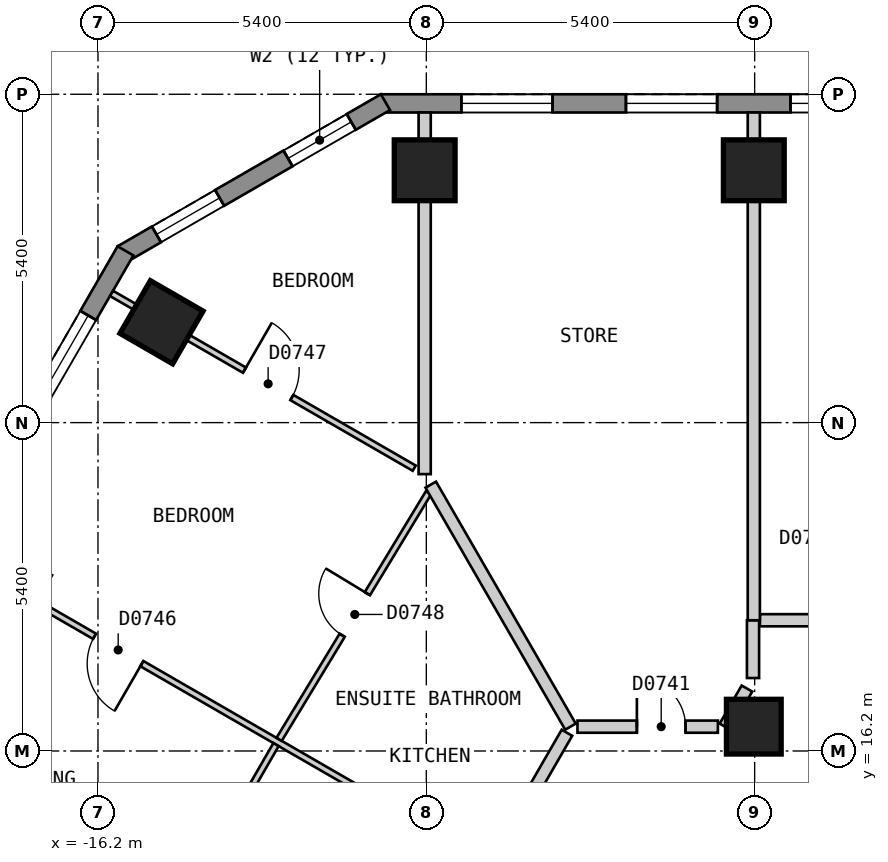
"""IFC4 building model, lengths in metres.
Left out: names, types, materials, properties, quantities, classifications, styles, units other than length and angle.
Written with IfcOpenShell. Run it as: python <this file> out.ifc"""

import sys

from ifc_helpers import new_model, si_unit, direction, frame, frame_2d, origin, origin_2d, place, context, subcontext, project, spatial, polyline, rectangle, outline, extrude, element, fill, save


model = new_model("IFC4")
c1 = context("Model", 3, precision=1e-05, world=origin(), true_north=direction((0.0, 1.0)))
c2 = subcontext(c1, "Body", "Model", "MODEL_VIEW")
j1 = project(units=[si_unit("LENGTHUNIT", "METRE"), si_unit("PLANEANGLEUNIT", "RADIAN")], contexts=[c1])
p1 = place(None, origin())
s1 = spatial("IfcSite", under=j1, at=p1, CompositionType="ELEMENT")
p2 = place(p1, origin())
s2 = spatial("IfcBuilding", under=s1, at=p2, CompositionType="ELEMENT")
p3 = place(p2, frame((0.0, 0.0, 93.0)))
s3 = spatial("IfcBuildingStorey", under=s2, at=p3, CompositionType="ELEMENT", Elevation=93.0)
for number, where, z_axis, x_axis in (
    (1, (-5.414, 25.75, 0.0), (0.0, 0.0, 1.0), (-1.0, 0.0, 0.0)),
    (2, (-10.827, 25.75, 0.0), (0.0, 0.0, 1.0), (-1.0, 0.0, 0.0)),
    (3, (-15.155, 23.251, 0.0), (0.0, 0.0, 1.0), (-0.5, -0.866, 0.0)),
):
    element("IfcColumn", number, at=place(p3, frame(where, z_axis=z_axis, x_axis=x_axis)), inside=s3, PredefinedType="COLUMN", context=c2, shape_type="SweptSolid", body=[
        extrude(rectangle(XDim=1.0, YDim=1.0, at=origin_2d()), origin(), (0.0, 0.0, 1.0), 3.0),
    ])
p4 = place(p3, frame((-5.414, 16.6, 0.0), z_axis=(0.0, 0.0, 1.0), x_axis=(-1.0, 0.0, 0.0)))
e4 = element("IfcColumn", 4, at=p4, inside=s3, PredefinedType="COLUMN", context=c2, shape_type="SweptSolid", body=[
    extrude(rectangle(XDim=0.9, YDim=0.9, at=origin_2d()), origin(), (0.0, 0.0, 1.0), 3.0),
])
p5 = place(p3, frame((11.547, 26.85, 0.0), z_axis=(0.0, 0.0, 1.0), x_axis=(-1.0, 0.0, 0.0)))
e5 = element("IfcWall", 5, at=p5, inside=s3, PredefinedType="SOLIDWALL", context=c2, shape_type="SweptSolid", body=[
    extrude(outline(polyline([(0.0, -0.15), (23.094, -0.15), (23.014, 0.15), (0.08, 0.15), (0.0, -0.15)])), origin(), (0.0, 0.0, 1.0), 2.7),
])
p6 = place(p5, frame((1.325, 0.0, 0.15)))
e6 = element("IfcOpeningElement", 6, at=p6, cuts=e5, PredefinedType="OPENING", context=c2, shape_type="SweptSolid", body=[
    extrude(rectangle(XDim=1.5, YDim=2.1, at=frame_2d((0.75, 1.05))), frame((0.0, 0.16, 0.0), z_axis=(0.0, -1.0, 0.0), x_axis=(1.0, 0.0, 0.0)), (0.0, 0.0, 1.0), 0.32),
])
p7 = place(p5, frame((4.032, 0.0, 0.15)))
e7 = element("IfcOpeningElement", 7, at=p7, cuts=e5, PredefinedType="OPENING", context=c2, shape_type="SweptSolid", body=[
    extrude(rectangle(XDim=1.5, YDim=2.1, at=frame_2d((0.75, 1.05))), frame((0.0, 0.16, 0.0), z_axis=(0.0, -1.0, 0.0), x_axis=(1.0, 0.0, 0.0)), (0.0, 0.0, 1.0), 0.32),
])
p8 = place(p5, frame((6.738, 0.0, 0.15)))
e8 = element("IfcOpeningElement", 8, at=p8, cuts=e5, PredefinedType="OPENING", context=c2, shape_type="SweptSolid", body=[
    extrude(rectangle(XDim=1.5, YDim=2.1, at=frame_2d((0.75, 1.05))), frame((0.0, 0.16, 0.0), z_axis=(0.0, -1.0, 0.0), x_axis=(1.0, 0.0, 0.0)), (0.0, 0.0, 1.0), 0.32),
])
p9 = place(p5, frame((9.445, 0.0, 0.15)))
e9 = element("IfcOpeningElement", 9, at=p9, cuts=e5, PredefinedType="OPENING", context=c2, shape_type="SweptSolid", body=[
    extrude(rectangle(XDim=1.5, YDim=2.1, at=frame_2d((0.75, 1.05))), frame((0.0, 0.16, 0.0), z_axis=(0.0, -1.0, 0.0), x_axis=(1.0, 0.0, 0.0)), (0.0, 0.0, 1.0), 0.32),
])
p10 = place(p5, frame((12.151, 0.0, 0.15)))
e10 = element("IfcOpeningElement", 10, at=p10, cuts=e5, PredefinedType="OPENING", context=c2, shape_type="SweptSolid", body=[
    extrude(rectangle(XDim=1.5, YDim=2.1, at=frame_2d((0.75, 1.05))), frame((0.0, 0.16, 0.0), z_axis=(0.0, -1.0, 0.0), x_axis=(1.0, 0.0, 0.0)), (0.0, 0.0, 1.0), 0.32),
])
p11 = place(p5, frame((14.858, 0.0, 0.15)))
e11 = element("IfcOpeningElement", 11, at=p11, cuts=e5, PredefinedType="OPENING", context=c2, shape_type="SweptSolid", body=[
    extrude(rectangle(XDim=1.5, YDim=2.1, at=frame_2d((0.75, 1.05))), frame((0.0, 0.16, 0.0), z_axis=(0.0, -1.0, 0.0), x_axis=(1.0, 0.0, 0.0)), (0.0, 0.0, 1.0), 0.32),
])
p12 = place(p5, frame((17.564, 0.0, 0.15)))
e12 = element("IfcOpeningElement", 12, at=p12, cuts=e5, PredefinedType="OPENING", context=c2, shape_type="SweptSolid", body=[
    extrude(rectangle(XDim=1.5, YDim=2.1, at=frame_2d((0.75, 1.05))), frame((0.0, 0.16, 0.0), z_axis=(0.0, -1.0, 0.0), x_axis=(1.0, 0.0, 0.0)), (0.0, 0.0, 1.0), 0.32),
])
p13 = place(p5, frame((20.271, 0.0, 0.15)))
e13 = element("IfcOpeningElement", 13, at=p13, cuts=e5, PredefinedType="OPENING", context=c2, shape_type="SweptSolid", body=[
    extrude(rectangle(XDim=1.5, YDim=2.1, at=frame_2d((0.75, 1.05))), frame((0.0, 0.16, 0.0), z_axis=(0.0, -1.0, 0.0), x_axis=(1.0, 0.0, 0.0)), (0.0, 0.0, 1.0), 0.32),
])
p14 = place(p3, frame((-11.472, 26.87, 0.0), z_axis=(0.0, 0.0, 1.0), x_axis=(-0.866022959057, -0.500004234368, 0.0)))
e14 = element("IfcWall", 14, at=p14, inside=s3, PredefinedType="SOLIDWALL", context=c2, shape_type="SweptSolid", body=[
    extrude(outline(polyline([(0.0, -0.15), (5.0, -0.15), (4.92, 0.15), (0.08, 0.15), (0.0, -0.15)])), origin(), (0.0, 0.0, 1.0), 2.7),
])
p15 = place(p14, frame((0.65, 0.0, 0.15)))
e15 = element("IfcOpeningElement", 15, at=p15, cuts=e14, PredefinedType="OPENING", context=c2, shape_type="SweptSolid", body=[
    extrude(rectangle(XDim=1.2, YDim=2.1, at=frame_2d((0.6, 1.05))), frame((0.0, 0.16, 0.0), z_axis=(0.0, -1.0, 0.0), x_axis=(1.0, 0.0, 0.0)), (0.0, 0.0, 1.0), 0.32),
])
p16 = place(p14, frame((3.149, 0.0, 0.15)))
e16 = element("IfcOpeningElement", 16, at=p16, cuts=e14, PredefinedType="OPENING", context=c2, shape_type="SweptSolid", body=[
    extrude(rectangle(XDim=1.2, YDim=2.1, at=frame_2d((0.6, 1.05))), frame((0.0, 0.16, 0.0), z_axis=(0.0, -1.0, 0.0), x_axis=(1.0, 0.0, 0.0)), (0.0, 0.0, 1.0), 0.32),
])
p17 = place(p3, frame((-15.747, 24.425, 0.0), z_axis=(0.0, 0.0, 1.0), x_axis=(-0.500027479704, -0.866009537788, 0.0)))
e17 = element("IfcWall", 17, at=p17, inside=s3, PredefinedType="SOLIDWALL", context=c2, shape_type="SweptSolid", body=[
    extrude(outline(polyline([(0.0, -0.15), (26.559, -0.15), (26.478, 0.15), (0.08, 0.15), (0.0, -0.15)])), origin(), (0.0, 0.0, 1.0), 2.7),
])
p18 = place(p17, frame((1.227, 0.0, 0.15)))
e18 = element("IfcOpeningElement", 18, at=p18, cuts=e17, PredefinedType="OPENING", context=c2, shape_type="SweptSolid", body=[
    extrude(rectangle(XDim=1.5, YDim=2.1, at=frame_2d((0.75, 1.05))), frame((0.0, 0.16, 0.0), z_axis=(0.0, -1.0, 0.0), x_axis=(1.0, 0.0, 0.0)), (0.0, 0.0, 1.0), 0.32),
])
p19 = place(p17, frame((3.739, 0.0, 0.15)))
e19 = element("IfcOpeningElement", 19, at=p19, cuts=e17, PredefinedType="OPENING", context=c2, shape_type="SweptSolid", body=[
    extrude(rectangle(XDim=1.5, YDim=2.1, at=frame_2d((0.75, 1.05))), frame((0.0, 0.16, 0.0), z_axis=(0.0, -1.0, 0.0), x_axis=(1.0, 0.0, 0.0)), (0.0, 0.0, 1.0), 0.32),
])
p20 = place(p17, frame((6.25, 0.0, 0.15)))
e20 = element("IfcOpeningElement", 20, at=p20, cuts=e17, PredefinedType="OPENING", context=c2, shape_type="SweptSolid", body=[
    extrude(rectangle(XDim=1.5, YDim=2.1, at=frame_2d((0.75, 1.05))), frame((0.0, 0.16, 0.0), z_axis=(0.0, -1.0, 0.0), x_axis=(1.0, 0.0, 0.0)), (0.0, 0.0, 1.0), 0.32),
])
p21 = place(p17, frame((8.761, 0.0, 0.15)))
e21 = element("IfcOpeningElement", 21, at=p21, cuts=e17, PredefinedType="OPENING", context=c2, shape_type="SweptSolid", body=[
    extrude(rectangle(XDim=1.5, YDim=2.1, at=frame_2d((0.75, 1.05))), frame((0.0, 0.16, 0.0), z_axis=(0.0, -1.0, 0.0), x_axis=(1.0, 0.0, 0.0)), (0.0, 0.0, 1.0), 0.32),
])
p22 = place(p17, frame((11.273, 0.0, 0.15)))
e22 = element("IfcOpeningElement", 22, at=p22, cuts=e17, PredefinedType="OPENING", context=c2, shape_type="SweptSolid", body=[
    extrude(rectangle(XDim=1.5, YDim=2.1, at=frame_2d((0.75, 1.05))), frame((0.0, 0.16, 0.0), z_axis=(0.0, -1.0, 0.0), x_axis=(1.0, 0.0, 0.0)), (0.0, 0.0, 1.0), 0.32),
])
p23 = place(p17, frame((13.785, 0.0, 0.15)))
e23 = element("IfcOpeningElement", 23, at=p23, cuts=e17, PredefinedType="OPENING", context=c2, shape_type="SweptSolid", body=[
    extrude(rectangle(XDim=1.5, YDim=2.1, at=frame_2d((0.75, 1.05))), frame((0.0, 0.16, 0.0), z_axis=(0.0, -1.0, 0.0), x_axis=(1.0, 0.0, 0.0)), (0.0, 0.0, 1.0), 0.32),
])
p24 = place(p17, frame((16.296, 0.0, 0.15)))
e24 = element("IfcOpeningElement", 24, at=p24, cuts=e17, PredefinedType="OPENING", context=c2, shape_type="SweptSolid", body=[
    extrude(rectangle(XDim=1.5, YDim=2.1, at=frame_2d((0.75, 1.05))), frame((0.0, 0.16, 0.0), z_axis=(0.0, -1.0, 0.0), x_axis=(1.0, 0.0, 0.0)), (0.0, 0.0, 1.0), 0.32),
])
p25 = place(p17, frame((18.807, 0.0, 0.15)))
e25 = element("IfcOpeningElement", 25, at=p25, cuts=e17, PredefinedType="OPENING", context=c2, shape_type="SweptSolid", body=[
    extrude(rectangle(XDim=1.5, YDim=2.1, at=frame_2d((0.75, 1.05))), frame((0.0, 0.16, 0.0), z_axis=(0.0, -1.0, 0.0), x_axis=(1.0, 0.0, 0.0)), (0.0, 0.0, 1.0), 0.32),
])
p26 = place(p17, frame((21.319, 0.0, 0.15)))
e26 = element("IfcOpeningElement", 26, at=p26, cuts=e17, PredefinedType="OPENING", context=c2, shape_type="SweptSolid", body=[
    extrude(rectangle(XDim=1.5, YDim=2.1, at=frame_2d((0.75, 1.05))), frame((0.0, 0.16, 0.0), z_axis=(0.0, -1.0, 0.0), x_axis=(1.0, 0.0, 0.0)), (0.0, 0.0, 1.0), 0.32),
])
p27 = place(p17, frame((23.831, 0.0, 0.15)))
e27 = element("IfcOpeningElement", 27, at=p27, cuts=e17, PredefinedType="OPENING", context=c2, shape_type="SweptSolid", body=[
    extrude(rectangle(XDim=1.5, YDim=2.1, at=frame_2d((0.75, 1.05))), frame((0.0, 0.16, 0.0), z_axis=(0.0, -1.0, 0.0), x_axis=(1.0, 0.0, 0.0)), (0.0, 0.0, 1.0), 0.32),
])
p28 = place(p3, frame((-8.314, 16.6, 0.0), z_axis=(0.0, 0.0, 1.0), x_axis=(1.0, 0.0, 0.0)))
e28 = element("IfcWall", 28, at=p28, inside=s3, PredefinedType="PARTITIONING", context=c2, shape_type="SweptSolid", body=[
    extrude(rectangle(XDim=2.309, YDim=0.2, at=frame_2d((1.155, 0.0))), origin(), (0.0, 0.0, 1.0), 2.7),
])
p29 = place(p28, frame((0.977, 0.0, 0.0)))
e29 = element("IfcOpeningElement", 29, at=p29, cuts=e28, PredefinedType="OPENING", context=c2, shape_type="SweptSolid", body=[
    extrude(rectangle(XDim=0.8, YDim=2.1, at=frame_2d((0.4, 1.05))), frame((0.0, 0.11, 0.0), z_axis=(0.0, -1.0, 0.0), x_axis=(1.0, 0.0, 0.0)), (0.0, 0.0, 1.0), 0.22),
])
p30 = place(p3, frame((-5.314, 18.35, 0.0), z_axis=(0.0, 0.0, 1.0), x_axis=(1.0, 0.0, 0.0)))
e30 = element("IfcWall", 30, at=p30, inside=s3, PredefinedType="PARTITIONING", context=c2, shape_type="SweptSolid", body=[
    extrude(rectangle(XDim=7.062, YDim=0.2, at=frame_2d((3.531, 0.0))), origin(), (0.0, 0.0, 1.0), 2.7),
])
p31 = place(p30, frame((2.106, 0.0, 0.0)))
e31 = element("IfcOpeningElement", 31, at=p31, cuts=e30, PredefinedType="OPENING", context=c2, shape_type="SweptSolid", body=[
    extrude(rectangle(XDim=1.0, YDim=2.1, at=frame_2d((0.5, 1.05))), frame((0.0, 0.11, 0.0), z_axis=(0.0, -1.0, 0.0), x_axis=(1.0, 0.0, 0.0)), (0.0, 0.0, 1.0), 0.22),
])
p32 = place(p3, frame((-5.889, 16.6, 0.0), z_axis=(0.0, 0.0, 1.0), x_axis=(0.499839240638, 0.866118198353, 0.0)))
e32 = element("IfcWall", 32, at=p32, inside=s3, PredefinedType="PARTITIONING", context=c2, shape_type="SweptSolid", body=[
    extrude(rectangle(XDim=0.724, YDim=0.2, at=frame_2d((0.362, 0.0))), origin(), (0.0, 0.0, 1.0), 2.7),
])
p33 = place(p3, frame((-18.533, -0.901, 0.0), z_axis=(0.0, 0.0, 1.0), x_axis=(0.499981198768, 0.866036258409, 0.0)))
e33 = element("IfcWall", 33, at=p33, inside=s3, PredefinedType="PARTITIONING", context=c2, shape_type="SweptSolid", body=[
    extrude(rectangle(XDim=20.093, YDim=0.2, at=frame_2d((10.046, 0.0))), origin(), (0.0, 0.0, 1.0), 2.7),
])
p34 = place(p33, frame((14.57, 0.0, 0.0)))
e34 = element("IfcOpeningElement", 34, at=p34, cuts=e33, PredefinedType="OPENING", context=c2, shape_type="SweptSolid", body=[
    extrude(rectangle(XDim=1.0, YDim=2.1, at=frame_2d((0.5, 1.05))), frame((0.0, 0.11, 0.0), z_axis=(0.0, -1.0, 0.0), x_axis=(1.0, 0.0, 0.0)), (0.0, 0.0, 1.0), 0.22),
])
p35 = place(p33, frame((4.523, 0.0, 0.0)))
e35 = element("IfcOpeningElement", 35, at=p35, cuts=e33, PredefinedType="OPENING", context=c2, shape_type="SweptSolid", body=[
    extrude(rectangle(XDim=1.0, YDim=2.1, at=frame_2d((0.5, 1.05))), frame((0.0, 0.11, 0.0), z_axis=(0.0, -1.0, 0.0), x_axis=(1.0, 0.0, 0.0)), (0.0, 0.0, 1.0), 0.22),
])
p36 = place(p3, frame((-5.427, 17.4, 0.0), z_axis=(0.0, 0.0, 1.0), x_axis=(0.0, 1.0, 0.0)))
e36 = element("IfcWall", 36, at=p36, inside=s3, PredefinedType="PARTITIONING", context=c2, shape_type="SweptSolid", body=[
    extrude(rectangle(XDim=0.95, YDim=0.2, at=frame_2d((0.475, 0.0))), origin(), (0.0, 0.0, 1.0), 2.7),
])
p37 = place(p3, frame((-18.489, 19.375, 0.0), z_axis=(0.0, 0.0, 1.0), x_axis=(0.866016855193, -0.500014806302, 0.0)))
e37 = element("IfcWall", 37, at=p37, inside=s3, PredefinedType="PARTITIONING", context=c2, shape_type="SweptSolid", body=[
    extrude(rectangle(XDim=10.0, YDim=0.1, at=frame_2d((5.0, 0.0))), origin(), (0.0, 0.0, 1.0), 2.7),
])
p38 = place(p37, frame((2.577, 0.0, 0.0)))
e38 = element("IfcOpeningElement", 38, at=p38, cuts=e37, PredefinedType="OPENING", context=c2, shape_type="SweptSolid", body=[
    extrude(rectangle(XDim=0.9, YDim=2.1, at=frame_2d((0.45, 1.05))), frame((0.0, 0.06, 0.0), z_axis=(0.0, -1.0, 0.0), x_axis=(1.0, 0.0, 0.0)), (0.0, 0.0, 1.0), 0.12),
])
p39 = place(p3, frame((-15.977, 23.725, 0.0), z_axis=(0.0, 0.0, 1.0), x_axis=(0.866028566888, -0.499994521305, 0.0)))
e39 = element("IfcWall", 39, at=p39, inside=s3, PredefinedType="PARTITIONING", context=c2, shape_type="SweptSolid", body=[
    extrude(rectangle(XDim=5.748, YDim=0.1, at=frame_2d((2.874, 0.0))), origin(), (0.0, 0.0, 1.0), 2.7),
])
p40 = place(p39, frame((2.524, 0.0, 0.0)))
e40 = element("IfcOpeningElement", 40, at=p40, cuts=e39, PredefinedType="OPENING", context=c2, shape_type="SweptSolid", body=[
    extrude(rectangle(XDim=0.9, YDim=2.1, at=frame_2d((0.45, 1.05))), frame((0.0, 0.06, 0.0), z_axis=(0.0, -1.0, 0.0), x_axis=(1.0, 0.0, 0.0)), (0.0, 0.0, 1.0), 0.12),
])
p41 = place(p3, frame((-13.221, 16.391, 0.0), z_axis=(0.0, 0.0, 1.0), x_axis=(0.518164725284, 0.855280841286, 0.0)))
e41 = element("IfcWall", 41, at=p41, inside=s3, PredefinedType="PARTITIONING", context=c2, shape_type="SweptSolid", body=[
    extrude(rectangle(XDim=4.74, YDim=0.1, at=frame_2d((2.37, 0.0))), origin(), (0.0, 0.0, 1.0), 2.7),
])
p42 = place(p41, frame((2.002, 0.0, 0.0)))
e42 = element("IfcOpeningElement", 42, at=p42, cuts=e41, PredefinedType="OPENING", context=c2, shape_type="SweptSolid", body=[
    extrude(rectangle(XDim=0.8, YDim=2.1, at=frame_2d((0.4, 1.05))), frame((0.0, 0.06, 0.0), z_axis=(0.0, -1.0, 0.0), x_axis=(1.0, 0.0, 0.0)), (0.0, 0.0, 1.0), 0.12),
])
p43 = place(p3, frame((-15.708, 12.085, 0.0), z_axis=(0.0, 0.0, 1.0), x_axis=(0.499943653708, 0.866057932887, 0.0)))
e43 = element("IfcWall", 43, at=p43, inside=s3, PredefinedType="PARTITIONING", context=c2, shape_type="SweptSolid", body=[
    extrude(rectangle(XDim=4.873, YDim=0.1, at=frame_2d((2.436, 0.0))), origin(), (0.0, 0.0, 1.0), 2.7),
])
p44 = place(p43, frame((1.962, 0.0, 0.0)))
e44 = element("IfcOpeningElement", 44, at=p44, cuts=e43, PredefinedType="OPENING", context=c2, shape_type="SweptSolid", body=[
    extrude(rectangle(XDim=0.9, YDim=2.1, at=frame_2d((0.45, 1.05))), frame((0.0, 0.06, 0.0), z_axis=(0.0, -1.0, 0.0), x_axis=(1.0, 0.0, 0.0)), (0.0, 0.0, 1.0), 0.12),
])
p45 = place(p3, frame((-10.727, 20.58, 0.0), z_axis=(0.0, 0.0, 1.0), x_axis=(0.500041272028, -0.866001574057, 0.0)))
e45 = element("IfcWall", 45, at=p45, inside=s3, PredefinedType="PARTITIONING", context=c2, shape_type="SweptSolid", body=[
    extrude(rectangle(XDim=4.596, YDim=0.2, at=frame_2d((2.298, 0.0))), origin(), (0.0, 0.0, 1.0), 2.7),
])
p46 = place(p3, frame((-5.414, 26.7, 0.0), z_axis=(0.0, 0.0, 1.0), x_axis=(0.0, -1.0, 0.0)))
e46 = element("IfcWall", 46, at=p46, inside=s3, PredefinedType="PARTITIONING", context=c2, shape_type="SweptSolid", body=[
    extrude(rectangle(XDim=8.35, YDim=0.2, at=frame_2d((4.175, 0.0))), origin(), (0.0, 0.0, 1.0), 2.7),
])
p47 = place(p3, frame((-10.827, 20.753, 0.0), z_axis=(0.0, 0.0, 1.0), x_axis=(0.0, 1.0, 0.0)))
e47 = element("IfcWall", 47, at=p47, inside=s3, PredefinedType="PARTITIONING", context=c2, shape_type="SweptSolid", body=[
    extrude(rectangle(XDim=5.947, YDim=0.2, at=frame_2d((2.974, 0.0))), origin(), (0.0, 0.0, 1.0), 2.7),
])
p48 = place(p11, origin())
e48 = element("IfcWindow", 48, at=p48, inside=s3, PartitioningType="SINGLE_PANEL", PredefinedType="WINDOW", context=c2, shape_type="SweptSolid", body=[
    extrude(rectangle(XDim=1.5, YDim=2.1, at=frame_2d((0.75, 1.05))), frame((0.0, 0.03, 0.0), z_axis=(0.0, -1.0, 0.0), x_axis=(1.0, 0.0, 0.0)), (0.0, 0.0, 1.0), 0.06),
])
fill(e11, e48)
p49 = place(p12, origin())
e49 = element("IfcWindow", 49, at=p49, inside=s3, PartitioningType="SINGLE_PANEL", PredefinedType="WINDOW", context=c2, shape_type="SweptSolid", body=[
    extrude(rectangle(XDim=1.5, YDim=2.1, at=frame_2d((0.75, 1.05))), frame((0.0, 0.03, 0.0), z_axis=(0.0, -1.0, 0.0), x_axis=(1.0, 0.0, 0.0)), (0.0, 0.0, 1.0), 0.06),
])
fill(e12, e49)
p50 = place(p13, origin())
e50 = element("IfcWindow", 50, at=p50, inside=s3, PartitioningType="SINGLE_PANEL", PredefinedType="WINDOW", context=c2, shape_type="SweptSolid", body=[
    extrude(rectangle(XDim=1.5, YDim=2.1, at=frame_2d((0.75, 1.05))), frame((0.0, 0.03, 0.0), z_axis=(0.0, -1.0, 0.0), x_axis=(1.0, 0.0, 0.0)), (0.0, 0.0, 1.0), 0.06),
])
fill(e13, e50)
p51 = place(p15, origin())
e51 = element("IfcWindow", 51, at=p51, inside=s3, PartitioningType="SINGLE_PANEL", PredefinedType="WINDOW", context=c2, shape_type="SweptSolid", body=[
    extrude(rectangle(XDim=1.2, YDim=2.1, at=frame_2d((0.6, 1.05))), frame((0.0, 0.03, 0.0), z_axis=(0.0, -1.0, 0.0), x_axis=(1.0, 0.0, 0.0)), (0.0, 0.0, 1.0), 0.06),
])
fill(e15, e51)
p52 = place(p16, origin())
e52 = element("IfcWindow", 52, at=p52, inside=s3, PartitioningType="SINGLE_PANEL", PredefinedType="WINDOW", context=c2, shape_type="SweptSolid", body=[
    extrude(rectangle(XDim=1.2, YDim=2.1, at=frame_2d((0.6, 1.05))), frame((0.0, 0.03, 0.0), z_axis=(0.0, -1.0, 0.0), x_axis=(1.0, 0.0, 0.0)), (0.0, 0.0, 1.0), 0.06),
])
fill(e16, e52)
p53 = place(p18, origin())
e53 = element("IfcWindow", 53, at=p53, inside=s3, PartitioningType="SINGLE_PANEL", PredefinedType="WINDOW", context=c2, shape_type="SweptSolid", body=[
    extrude(rectangle(XDim=1.5, YDim=2.1, at=frame_2d((0.75, 1.05))), frame((0.0, 0.03, 0.0), z_axis=(0.0, -1.0, 0.0), x_axis=(1.0, 0.0, 0.0)), (0.0, 0.0, 1.0), 0.06),
])
fill(e18, e53)
p54 = place(p29, origin())
e54 = element("IfcDoor", 54, at=p54, inside=s3, OperationType="SINGLE_SWING_LEFT", PredefinedType="DOOR", context=c2, shape_type="SweptSolid", body=[
    extrude(rectangle(XDim=0.8, YDim=2.1, at=frame_2d((0.4, 1.05))), frame((0.0, 0.025, 0.0), z_axis=(0.0, -1.0, 0.0), x_axis=(1.0, 0.0, 0.0)), (0.0, 0.0, 1.0), 0.05),
])
fill(e29, e54)
p55 = place(p38, origin())
e55 = element("IfcDoor", 55, at=p55, inside=s3, OperationType="SINGLE_SWING_RIGHT", PredefinedType="DOOR", context=c2, shape_type="SweptSolid", body=[
    extrude(rectangle(XDim=0.9, YDim=2.1, at=frame_2d((0.45, 1.05))), frame((0.0, 0.025, 0.0), z_axis=(0.0, -1.0, 0.0), x_axis=(1.0, 0.0, 0.0)), (0.0, 0.0, 1.0), 0.05),
])
fill(e38, e55)
p56 = place(p40, origin())
e56 = element("IfcDoor", 56, at=p56, inside=s3, OperationType="SINGLE_SWING_LEFT", PredefinedType="DOOR", context=c2, shape_type="SweptSolid", body=[
    extrude(rectangle(XDim=0.9, YDim=2.1, at=frame_2d((0.45, 1.05))), frame((0.0, 0.025, 0.0), z_axis=(0.0, -1.0, 0.0), x_axis=(1.0, 0.0, 0.0)), (0.0, 0.0, 1.0), 0.05),
])
fill(e40, e56)
p57 = place(p42, origin())
e57 = element("IfcDoor", 57, at=p57, inside=s3, OperationType="SINGLE_SWING_RIGHT", PredefinedType="DOOR", context=c2, shape_type="SweptSolid", body=[
    extrude(rectangle(XDim=0.8, YDim=2.1, at=frame_2d((0.4, 1.05))), frame((0.0, 0.025, 0.0), z_axis=(0.0, -1.0, 0.0), x_axis=(1.0, 0.0, 0.0)), (0.0, 0.0, 1.0), 0.05),
])
fill(e42, e57)
save(model, sys.argv[1])
